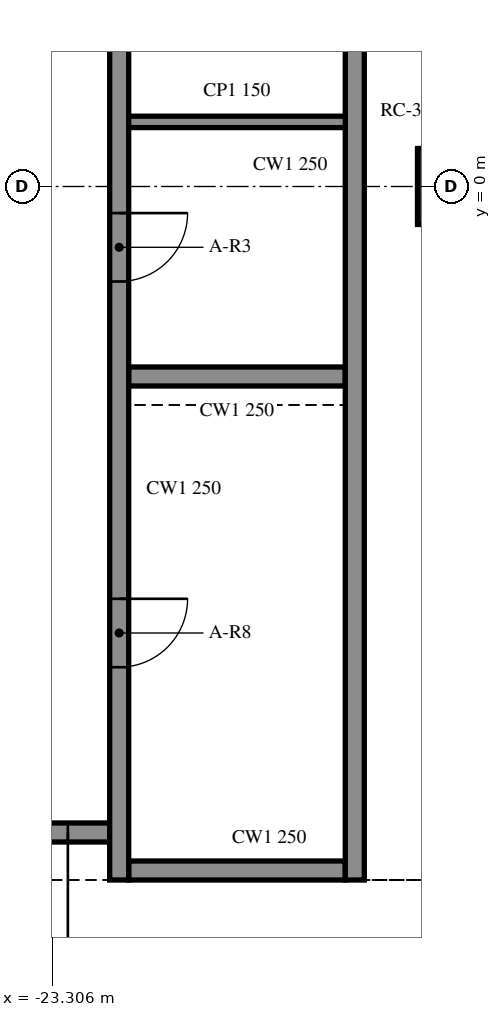
"""IFC4 building model, lengths in metres.
Left out: names, types, materials, properties, quantities, classifications, styles, units other than length and angle.
Written with IfcOpenShell. Run it as: python <this file> out.ifc"""

import sys

from ifc_helpers import new_model, si_unit, direction, frame, frame_2d, origin, origin_2d, place, context, subcontext, project, spatial, rectangle, extrude, element, fill, save


model = new_model("IFC4")
c1 = context("Model", 3, precision=1e-05, world=origin(), true_north=direction((0.0, 1.0)))
c2 = subcontext(c1, "Body", "Model", "MODEL_VIEW")
j1 = project(units=[si_unit("LENGTHUNIT", "METRE"), si_unit("PLANEANGLEUNIT", "RADIAN")], contexts=[c1])
p1 = place(None, origin())
s1 = spatial("IfcSite", under=j1, at=p1, CompositionType="ELEMENT")
p2 = place(p1, origin())
s2 = spatial("IfcBuilding", under=s1, at=p2, CompositionType="ELEMENT")
p3 = place(p2, frame((0.0, 0.0, 259.0)))
s3 = spatial("IfcBuildingStorey", under=s2, at=p3, CompositionType="ELEMENT", Elevation=259.0)
p4 = place(p3, frame((-18.0, 0.0, -0.4), z_axis=(0.0, 0.0, 1.0), x_axis=(1.0, 0.0, 0.0)))
e1 = element("IfcColumn", 1, at=p4, inside=s3, PredefinedType="COLUMN", context=c2, shape_type="SweptSolid", body=[
    extrude(rectangle(XDim=1.0, YDim=1.0, at=origin_2d()), origin(), (0.0, 0.0, 1.0), 4.36),
])
p5 = place(p3, frame((-19.325, -9.125, 0.0), z_axis=(0.0, 0.0, 1.0), x_axis=(0.0, 1.0, 0.0)))
e2 = element("IfcWall", 2, at=p5, inside=s3, PredefinedType="SOLIDWALL", context=c2, shape_type="SweptSolid", body=[
    extrude(rectangle(XDim=24.25, YDim=0.25, at=frame_2d((12.125, 0.0))), origin(), (0.0, 0.0, 1.0), 3.96),
])
p6 = place(p3, frame((-19.45, -9.0, 0.0), z_axis=(0.0, 0.0, 1.0), x_axis=(-1.0, 0.0, 0.0)))
e3 = element("IfcWall", 3, at=p6, inside=s3, PredefinedType="SOLIDWALL", context=c2, shape_type="SweptSolid", body=[
    extrude(rectangle(XDim=2.85, YDim=0.25, at=frame_2d((1.425, 0.0))), origin(), (0.0, 0.0, 1.0), 3.96),
])
p7 = place(p3, frame((-22.55, -8.5, 0.0), z_axis=(0.0, 0.0, 1.0), x_axis=(-1.0, 0.0, 0.0)))
e4 = element("IfcWall", 4, at=p7, inside=s3, PredefinedType="SOLIDWALL", context=c2, shape_type="SweptSolid", body=[
    extrude(rectangle(XDim=2.9, YDim=0.25, at=frame_2d((1.45, 0.0))), origin(), (0.0, 0.0, 1.0), 3.96),
])
p8 = place(p7, frame((0.55, 0.0, 0.0)))
e5 = element("IfcOpeningElement", 5, at=p8, cuts=e4, PredefinedType="OPENING", context=c2, shape_type="SweptSolid", body=[
    extrude(rectangle(XDim=1.8, YDim=2.1, at=frame_2d((0.9, 1.05))), frame((0.0, 0.135, 0.0), z_axis=(0.0, -1.0, 0.0), x_axis=(1.0, 0.0, 0.0)), (0.0, 0.0, 1.0), 0.27),
])
p9 = place(p3, frame((-22.425, 14.875, 0.0), z_axis=(0.0, 0.0, 1.0), x_axis=(0.0, -1.0, 0.0)))
e6 = element("IfcWall", 6, at=p9, inside=s3, PredefinedType="SOLIDWALL", context=c2, shape_type="SweptSolid", body=[
    extrude(rectangle(XDim=24.0, YDim=0.25, at=frame_2d((12.0, 0.0))), origin(), (0.0, 0.0, 1.0), 3.96),
])
p10 = place(p9, frame((15.225, 0.0, 0.0)))
e7 = element("IfcOpeningElement", 7, at=p10, cuts=e6, PredefinedType="OPENING", context=c2, shape_type="SweptSolid", body=[
    extrude(rectangle(XDim=0.9, YDim=2.1, at=frame_2d((0.45, 1.05))), frame((0.0, 0.135, 0.0), z_axis=(0.0, -1.0, 0.0), x_axis=(1.0, 0.0, 0.0)), (0.0, 0.0, 1.0), 0.27),
])
p11 = place(p9, frame((11.425, 0.0, 0.0)))
e8 = element("IfcOpeningElement", 8, at=p11, cuts=e6, PredefinedType="OPENING", context=c2, shape_type="SweptSolid", body=[
    extrude(rectangle(XDim=0.9, YDim=2.1, at=frame_2d((0.45, 1.05))), frame((0.0, 0.135, 0.0), z_axis=(0.0, -1.0, 0.0), x_axis=(1.0, 0.0, 0.0)), (0.0, 0.0, 1.0), 0.27),
])
p12 = place(p9, frame((7.625, 0.0, 0.0)))
e9 = element("IfcOpeningElement", 9, at=p12, cuts=e6, PredefinedType="OPENING", context=c2, shape_type="SweptSolid", body=[
    extrude(rectangle(XDim=0.9, YDim=2.1, at=frame_2d((0.45, 1.05))), frame((0.0, 0.135, 0.0), z_axis=(0.0, -1.0, 0.0), x_axis=(1.0, 0.0, 0.0)), (0.0, 0.0, 1.0), 0.27),
])
p13 = place(p9, frame((20.3, 0.0, 0.0)))
e10 = element("IfcOpeningElement", 10, at=p13, cuts=e6, PredefinedType="OPENING", context=c2, shape_type="SweptSolid", body=[
    extrude(rectangle(XDim=0.9, YDim=2.1, at=frame_2d((0.45, 1.05))), frame((0.0, 0.135, 0.0), z_axis=(0.0, -1.0, 0.0), x_axis=(1.0, 0.0, 0.0)), (0.0, 0.0, 1.0), 0.27),
])
p14 = place(p9, frame((3.847, 0.0, 0.0)))
e11 = element("IfcOpeningElement", 11, at=p14, cuts=e6, PredefinedType="OPENING", context=c2, shape_type="SweptSolid", body=[
    extrude(rectangle(XDim=0.9, YDim=2.1, at=frame_2d((0.45, 1.05))), frame((0.0, 0.135, 0.0), z_axis=(0.0, -1.0, 0.0), x_axis=(1.0, 0.0, 0.0)), (0.0, 0.0, 1.0), 0.27),
])
p15 = place(p9, frame((0.772, 0.0, 0.0)))
e12 = element("IfcOpeningElement", 12, at=p15, cuts=e6, PredefinedType="OPENING", context=c2, shape_type="SweptSolid", body=[
    extrude(rectangle(XDim=0.9, YDim=2.1, at=frame_2d((0.45, 1.05))), frame((0.0, 0.135, 0.0), z_axis=(0.0, -1.0, 0.0), x_axis=(1.0, 0.0, 0.0)), (0.0, 0.0, 1.0), 0.27),
])
p16 = place(p3, frame((-22.3, -2.5, 0.0), z_axis=(0.0, 0.0, 1.0), x_axis=(1.0, 0.0, 0.0)))
e13 = element("IfcWall", 13, at=p16, inside=s3, PredefinedType="SOLIDWALL", context=c2, shape_type="SweptSolid", body=[
    extrude(rectangle(XDim=2.85, YDim=0.25, at=frame_2d((1.425, 0.0))), origin(), (0.0, 0.0, 1.0), 3.96),
])
p17 = place(p3, frame((-22.3, 0.85, 0.0), z_axis=(0.0, 0.0, 1.0), x_axis=(1.0, 0.0, 0.0)))
e14 = element("IfcWall", 14, at=p17, inside=s3, PredefinedType="PARTITIONING", context=c2, shape_type="SweptSolid", body=[
    extrude(rectangle(XDim=2.85, YDim=0.15, at=frame_2d((1.425, 0.0))), origin(), (0.0, 0.0, 1.0), 3.96),
])
p18 = place(p8, origin())
e15 = element("IfcDoor", 15, at=p18, inside=s3, OperationType="DOUBLE_DOOR_SINGLE_SWING", PredefinedType="DOOR", context=c2, shape_type="SweptSolid", body=[
    extrude(rectangle(XDim=1.8, YDim=2.1, at=frame_2d((0.9, 1.05))), frame((0.0, 0.025, 0.0), z_axis=(0.0, -1.0, 0.0), x_axis=(1.0, 0.0, 0.0)), (0.0, 0.0, 1.0), 0.05),
])
fill(e5, e15)
p19 = place(p10, origin())
e16 = element("IfcDoor", 16, at=p19, inside=s3, OperationType="SINGLE_SWING_LEFT", PredefinedType="DOOR", context=c2, shape_type="SweptSolid", body=[
    extrude(rectangle(XDim=0.9, YDim=2.1, at=frame_2d((0.45, 1.05))), frame((0.0, 0.025, 0.0), z_axis=(0.0, -1.0, 0.0), x_axis=(1.0, 0.0, 0.0)), (0.0, 0.0, 1.0), 0.05),
])
fill(e7, e16)
p20 = place(p13, origin())
e17 = element("IfcDoor", 17, at=p20, inside=s3, OperationType="SINGLE_SWING_RIGHT", PredefinedType="DOOR", context=c2, shape_type="SweptSolid", body=[
    extrude(rectangle(XDim=0.9, YDim=2.1, at=frame_2d((0.45, 1.05))), frame((0.0, 0.025, 0.0), z_axis=(0.0, -1.0, 0.0), x_axis=(1.0, 0.0, 0.0)), (0.0, 0.0, 1.0), 0.05),
])
fill(e10, e17)
save(model, sys.argv[1])
